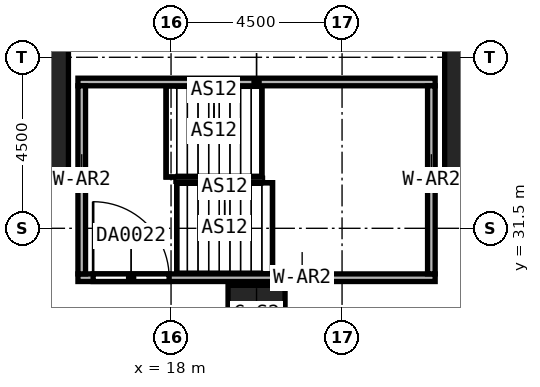
"""IFC4 building model, lengths in metres.
Left out: names, types, materials, properties, quantities, classifications, styles, units other than length and angle.
Written with IfcOpenShell. Run it as: python <this file> out.ifc"""

import sys

from ifc_helpers import new_model, si_unit, direction, frame, frame_2d, origin, origin_2d, place, context, subcontext, project, spatial, rectangle, extrude, element, fill, save


model = new_model("IFC4")
c1 = context("Model", 3, precision=1e-05, world=origin(), true_north=direction((0.0, 1.0)))
c2 = subcontext(c1, "Body", "Model", "MODEL_VIEW")
j1 = project(units=[si_unit("LENGTHUNIT", "METRE"), si_unit("PLANEANGLEUNIT", "RADIAN")], contexts=[c1])
p1 = place(None, origin())
s1 = spatial("IfcSite", under=j1, at=p1, CompositionType="ELEMENT")
p2 = place(p1, origin())
s2 = spatial("IfcBuilding", under=s1, at=p2, CompositionType="ELEMENT")
p3 = place(p2, frame((0.0, 0.0, 25.0)))
s3 = spatial("IfcBuildingStorey", under=s2, at=p3, CompositionType="ELEMENT", Elevation=25.0)
for number, where, z_axis, x_axis in (
    (1, (13.5, 36.0, 0.0), (0.0, 0.0, 1.0), (1.0, 0.0, 0.0)),
    (2, (27.0, 36.0, 0.0), (0.0, 0.0, 1.0), (1.0, 0.0, 0.0)),
):
    element("IfcColumn", number, at=place(p3, frame(where, z_axis=z_axis, x_axis=x_axis)), inside=s3, PredefinedType="COLUMN", context=c2, shape_type="SweptSolid", body=[
        extrude(rectangle(XDim=3.6, YDim=6.0, at=origin_2d()), origin(), (0.0, 0.0, 1.0), 6.0),
    ])
p4 = place(p3, frame((20.25, 29.25, 0.0), z_axis=(0.0, 0.0, 1.0), x_axis=(1.0, 0.0, 0.0)))
e3 = element("IfcColumn", 3, at=p4, inside=s3, PredefinedType="COLUMN", context=c2, shape_type="SweptSolid", body=[
    extrude(rectangle(XDim=1.5, YDim=1.5, at=origin_2d()), origin(), (0.0, 0.0, 1.0), 6.0),
])
p5 = place(p3, frame((15.55, 30.2, 0.0), z_axis=(0.0, 0.0, 1.0), x_axis=(1.0, 0.0, 0.0)))
e4 = element("IfcWall", 4, at=p5, inside=s3, PredefinedType="SOLIDWALL", context=c2, shape_type="SweptSolid", body=[
    extrude(rectangle(XDim=9.4, YDim=0.2, at=frame_2d((4.7, 0.0))), origin(), (0.0, 0.0, 1.0), 6.0),
])
p6 = place(p5, frame((0.4, 0.0, 0.0)))
e5 = element("IfcOpeningElement", 5, at=p6, cuts=e4, PredefinedType="OPENING", context=c2, shape_type="SweptSolid", body=[
    extrude(rectangle(XDim=2.0, YDim=2.4, at=frame_2d((1.0, 1.2))), frame((0.0, 0.1, 0.0), z_axis=(0.0, -1.0, 0.0), x_axis=(1.0, 0.0, 0.0)), (0.0, 0.0, 1.0), 0.2),
])
p7 = place(p3, frame((15.55, 35.35, 0.0), z_axis=(0.0, 0.0, 1.0), x_axis=(1.0, 0.0, 0.0)))
e6 = element("IfcWall", 6, at=p7, inside=s3, PredefinedType="SOLIDWALL", context=c2, shape_type="SweptSolid", body=[
    extrude(rectangle(XDim=9.4, YDim=0.2, at=frame_2d((4.7, 0.0))), origin(), (0.0, 0.0, 1.0), 6.0),
])
for number, where, z_axis, x_axis in (
    (7, (15.65, 30.3, 0.0), (0.0, 0.0, 1.0), (0.0, 1.0, 0.0)),
    (8, (24.85, 30.3, 0.0), (0.0, 0.0, 1.0), (0.0, 1.0, 0.0)),
):
    element("IfcWall", number, at=place(p3, frame(where, z_axis=z_axis, x_axis=x_axis)), inside=s3, PredefinedType="SOLIDWALL", context=c2, shape_type="SweptSolid", body=[
        extrude(rectangle(XDim=4.95, YDim=0.2, at=frame_2d((2.475, 0.0))), origin(), (0.0, 0.0, 1.0), 6.0),
    ])
p8 = place(p6, origin())
e9 = element("IfcDoor", 9, at=p8, inside=s3, OperationType="DOUBLE_DOOR_SINGLE_SWING", PredefinedType="DOOR", context=c2, shape_type="SweptSolid", body=[
    extrude(rectangle(XDim=2.0, YDim=2.4, at=frame_2d((1.0, 1.2))), frame((0.0, 0.025, 0.0), z_axis=(0.0, -1.0, 0.0), x_axis=(1.0, 0.0, 0.0)), (0.0, 0.0, 1.0), 0.05),
])
fill(e5, e9)
save(model, sys.argv[1])
